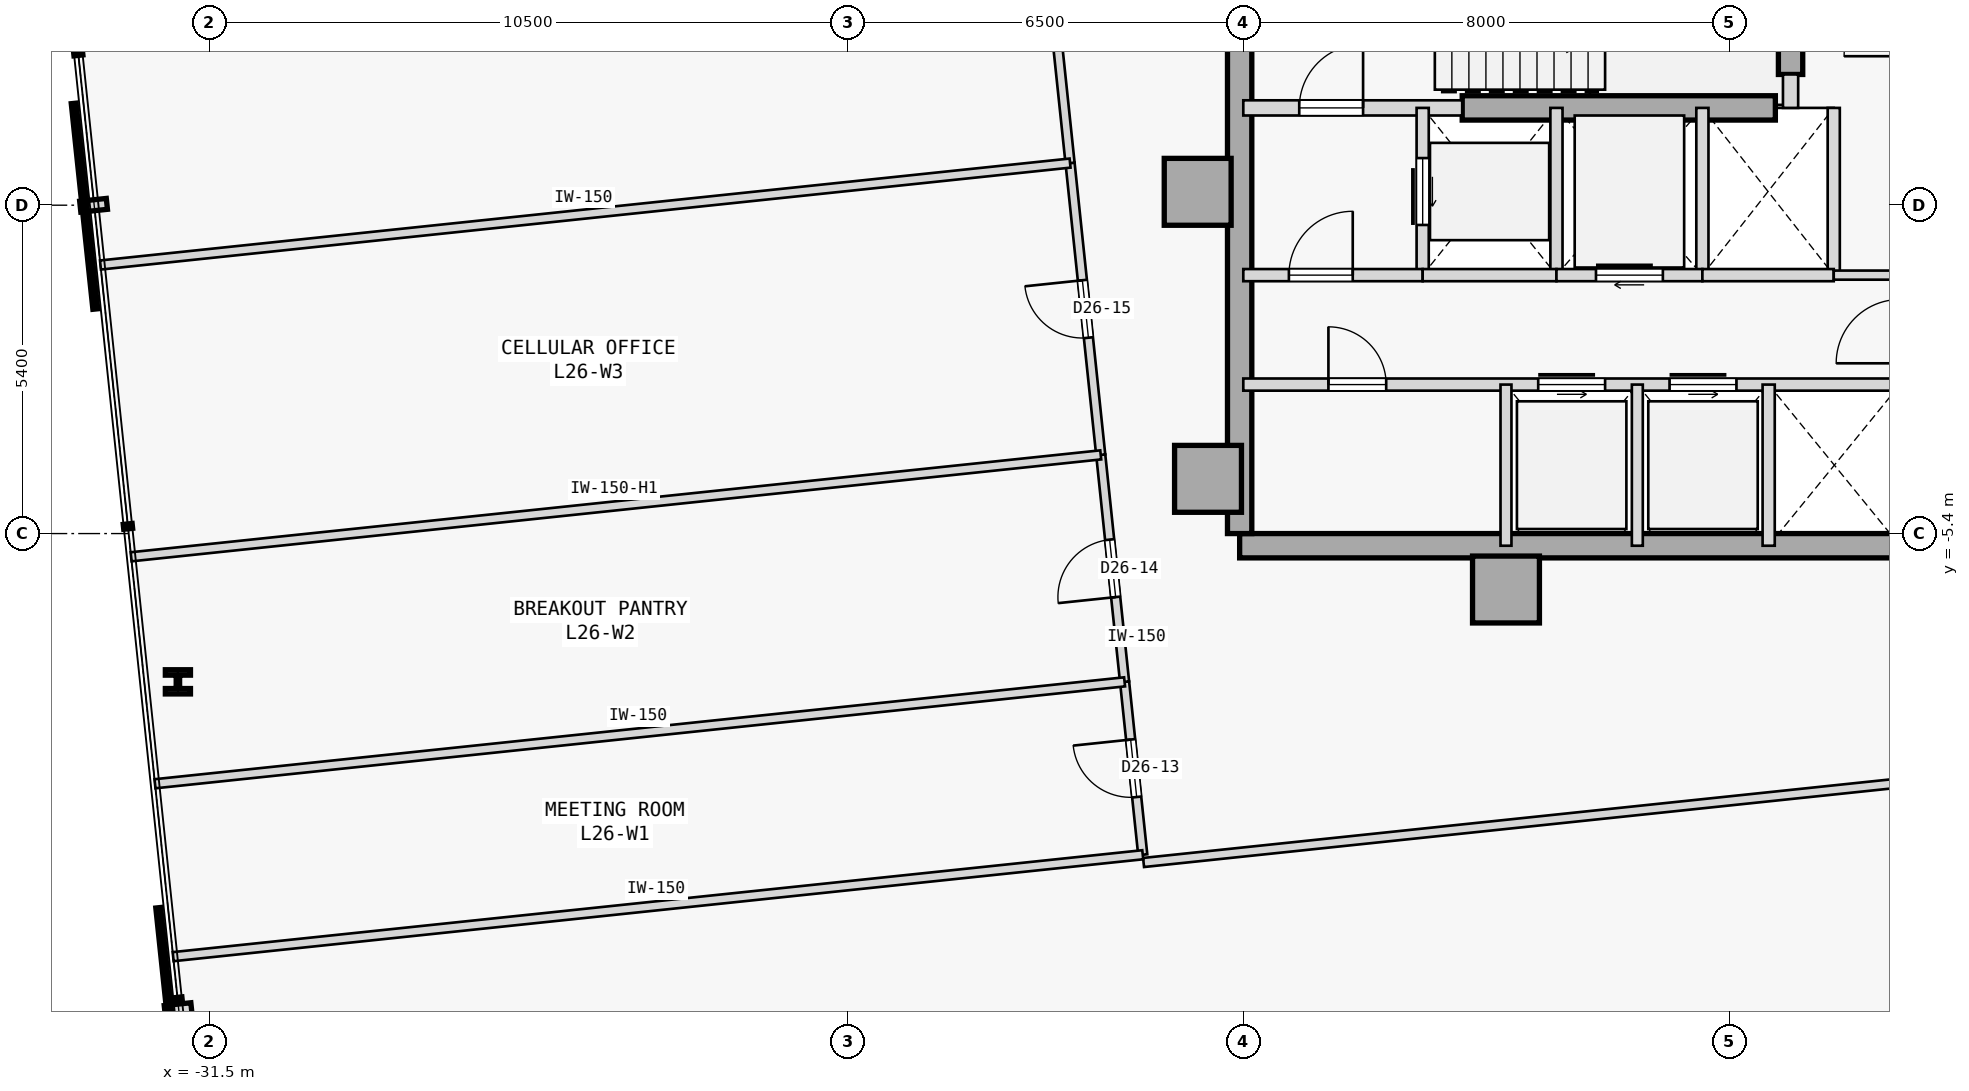
"""IFC4 building model, lengths in metres.
Left out: names, types, materials, properties, quantities, classifications, styles, units other than length and angle.
Written with IfcOpenShell. Run it as: python <this file> out.ifc"""

import sys

from ifc_helpers import new_model, si_unit, direction, frame, frame_2d, origin, origin_2d, place, context, subcontext, project, spatial, rectangle, i_section, extrude, element, fill, save


model = new_model("IFC4")
c1 = context("Model", 3, precision=1e-05, world=origin(), true_north=direction((0.0, 1.0)))
c2 = subcontext(c1, "Body", "Model", "MODEL_VIEW")
j1 = project(units=[si_unit("LENGTHUNIT", "METRE"), si_unit("PLANEANGLEUNIT", "RADIAN")], contexts=[c1])
p1 = place(None, origin())
s1 = spatial("IfcSite", under=j1, at=p1, CompositionType="ELEMENT")
p2 = place(p1, origin())
s2 = spatial("IfcBuilding", under=s1, at=p2, CompositionType="ELEMENT")
p3 = place(p2, frame((0.0, 0.0, 105.9)))
s3 = spatial("IfcBuildingStorey", under=s2, at=p3, CompositionType="ELEMENT", Elevation=105.9)
for number, where, z_axis, x_axis in (
    (1, (-15.25, 0.22, 0.0), (0.0, 0.0, 1.0), (1.0, 0.0, 0.0)),
    (2, (-15.08, -4.5, 0.0), (0.0, 0.0, 1.0), (1.0, 0.0, 0.0)),
    (3, (-10.18, -6.32, 0.0), (0.0, 0.0, 1.0), (1.0, 0.0, 0.0)),
):
    element("IfcColumn", number, at=place(p3, frame(where, z_axis=z_axis, x_axis=x_axis)), inside=s3, PredefinedType="COLUMN", context=c2, shape_type="SweptSolid", body=[
        extrude(rectangle(XDim=1.1, YDim=1.1, at=origin_2d()), origin(), (0.0, 0.0, 1.0), 3.7),
    ])
p4 = place(p3, frame((-14.56, -5.6, 0.0), z_axis=(0.0, 0.0, 1.0), x_axis=(1.0, 0.0, 0.0)))
e4 = element("IfcWall", 4, at=p4, inside=s3, PredefinedType="SHEAR", context=c2, shape_type="SweptSolid", body=[
    extrude(rectangle(XDim=10.86, YDim=0.4, at=frame_2d((5.43, 0.0))), origin(), (0.0, 0.0, 1.0), 3.475),
])
p5 = place(p3, frame((-14.56, -5.4, 0.0), z_axis=(0.0, 0.0, 1.0), x_axis=(0.0, 1.0, 0.0)))
e5 = element("IfcWall", 5, at=p5, inside=s3, PredefinedType="SHEAR", context=c2, shape_type="SweptSolid", body=[
    extrude(rectangle(XDim=10.8, YDim=0.4, at=frame_2d((5.4, 0.0))), origin(), (0.0, 0.0, 1.0), 3.475),
])
p6 = place(p3, frame((-5.5, 2.15, 0.0), z_axis=(0.0, 0.0, 1.0), x_axis=(0.0, 1.0, 0.0)))
e6 = element("IfcWall", 6, at=p6, inside=s3, PredefinedType="SHEAR", context=c2, shape_type="SweptSolid", body=[
    extrude(rectangle(XDim=3.25, YDim=0.4, at=frame_2d((1.625, 0.0))), origin(), (0.0, 0.0, 1.0), 3.475),
])
p7 = place(p3, frame((-10.9, 1.6, 0.0), z_axis=(0.0, 0.0, 1.0), x_axis=(1.0, 0.0, 0.0)))
e7 = element("IfcWall", 7, at=p7, inside=s3, PredefinedType="SHEAR", context=c2, shape_type="SweptSolid", body=[
    extrude(rectangle(XDim=5.15, YDim=0.4, at=frame_2d((2.575, 0.0))), origin(), (0.0, 0.0, 1.0), 3.475),
])
p8 = place(p3, frame((-32.021, -7.838, 0.0), z_axis=(0.0, 0.0, 1.0), x_axis=(1.0, 0.0, 0.0)))
e8 = element("IfcColumn", 8, at=p8, inside=s3, PredefinedType="COLUMN", context=c2, shape_type="SweptSolid", body=[
    extrude(i_section(OverallWidth=0.413, OverallDepth=0.398, WebThickness=0.056, FlangeThickness=0.089, FilletRadius=0.015, at=origin_2d()), origin(), (0.0, 0.0, 1.0), 3.7),
])
p9 = place(p3, frame((-14.5, 1.6, 0.0), z_axis=(0.0, 0.0, 1.0), x_axis=(1.0, 0.0, 0.0)))
e9 = element("IfcWall", 9, at=p9, inside=s3, PredefinedType="STANDARD", context=c2, shape_type="SweptSolid", body=[
    extrude(rectangle(XDim=3.6, YDim=0.25, at=frame_2d((1.8, 0.0))), origin(), (0.0, 0.0, 1.0), 3.475),
])
p10 = place(p9, frame((0.92, 0.0, 0.0)))
e10 = element("IfcOpeningElement", 10, at=p10, cuts=e9, PredefinedType="OPENING", context=c2, shape_type="SweptSolid", body=[
    extrude(rectangle(XDim=1.05, YDim=2.15, at=frame_2d((0.525, 1.075))), frame((0.0, 0.135, 0.0), z_axis=(0.0, -1.0, 0.0), x_axis=(1.0, 0.0, 0.0)), (0.0, 0.0, 1.0), 0.27),
])
p11 = place(p3, frame((-5.5, 1.6, 0.0), z_axis=(0.0, 0.0, 1.0), x_axis=(0.0, 1.0, 0.0)))
e11 = element("IfcWall", 11, at=p11, inside=s3, PredefinedType="STANDARD", context=c2, shape_type="SweptSolid", body=[
    extrude(rectangle(XDim=0.55, YDim=0.25, at=frame_2d((0.275, 0.0))), origin(), (0.0, 0.0, 1.0), 3.475),
])
p12 = place(p3, frame((-11.55, -1.15, 0.0), z_axis=(0.0, 0.0, 1.0), x_axis=(0.0, 1.0, 0.0)))
e12 = element("IfcWall", 12, at=p12, inside=s3, PredefinedType="STANDARD", context=c2, shape_type="SweptSolid", body=[
    extrude(rectangle(XDim=2.75, YDim=0.2, at=frame_2d((1.375, 0.0))), origin(), (0.0, 0.0, 1.0), 3.475),
])
p13 = place(p12, frame((0.825, 0.0, 0.0)))
e13 = element("IfcOpeningElement", 13, at=p13, cuts=e12, PredefinedType="OPENING", context=c2, shape_type="SweptSolid", body=[
    extrude(rectangle(XDim=1.1, YDim=2.15, at=frame_2d((0.55, 1.075))), frame((0.0, 0.11, 0.0), z_axis=(0.0, -1.0, 0.0), x_axis=(1.0, 0.0, 0.0)), (0.0, 0.0, 1.0), 0.22),
])
p14 = place(p3, frame((-9.35, -1.15, 0.0), z_axis=(0.0, 0.0, 1.0), x_axis=(0.0, 1.0, 0.0)))
e14 = element("IfcWall", 14, at=p14, inside=s3, PredefinedType="STANDARD", context=c2, shape_type="SweptSolid", body=[
    extrude(rectangle(XDim=2.75, YDim=0.2, at=frame_2d((1.375, 0.0))), origin(), (0.0, 0.0, 1.0), 3.475),
])
p15 = place(p3, frame((-14.5, -1.15, 0.0), z_axis=(0.0, 0.0, 1.0), x_axis=(1.0, 0.0, 0.0)))
e15 = element("IfcWall", 15, at=p15, inside=s3, PredefinedType="STANDARD", context=c2, shape_type="SweptSolid", body=[
    extrude(rectangle(XDim=2.95, YDim=0.2, at=frame_2d((1.475, 0.0))), origin(), (0.0, 0.0, 1.0), 3.475),
])
p16 = place(p15, frame((0.75, 0.0, 0.0)))
e16 = element("IfcOpeningElement", 16, at=p16, cuts=e15, PredefinedType="OPENING", context=c2, shape_type="SweptSolid", body=[
    extrude(rectangle(XDim=1.05, YDim=2.18, at=frame_2d((0.525, 1.09))), frame((0.0, 0.11, 0.0), z_axis=(0.0, -1.0, 0.0), x_axis=(1.0, 0.0, 0.0)), (0.0, 0.0, 1.0), 0.22),
])
p17 = place(p3, frame((-11.55, -1.15, 0.0), z_axis=(0.0, 0.0, 1.0), x_axis=(1.0, 0.0, 0.0)))
e17 = element("IfcWall", 17, at=p17, inside=s3, PredefinedType="STANDARD", context=c2, shape_type="SweptSolid", body=[
    extrude(rectangle(XDim=2.2, YDim=0.2, at=frame_2d((1.1, 0.0))), origin(), (0.0, 0.0, 1.0), 3.475),
])
p18 = place(p3, frame((-6.95, -1.15, 0.0), z_axis=(0.0, 0.0, 1.0), x_axis=(0.0, 1.0, 0.0)))
e18 = element("IfcWall", 18, at=p18, inside=s3, PredefinedType="STANDARD", context=c2, shape_type="SweptSolid", body=[
    extrude(rectangle(XDim=2.75, YDim=0.2, at=frame_2d((1.375, 0.0))), origin(), (0.0, 0.0, 1.0), 3.475),
])
p19 = place(p3, frame((-9.35, -1.15, 0.0), z_axis=(0.0, 0.0, 1.0), x_axis=(1.0, 0.0, 0.0)))
e19 = element("IfcWall", 19, at=p19, inside=s3, PredefinedType="STANDARD", context=c2, shape_type="SweptSolid", body=[
    extrude(rectangle(XDim=2.4, YDim=0.2, at=frame_2d((1.2, 0.0))), origin(), (0.0, 0.0, 1.0), 3.475),
])
p20 = place(p19, frame((0.65, 0.0, 0.0)))
e20 = element("IfcOpeningElement", 20, at=p20, cuts=e19, PredefinedType="OPENING", context=c2, shape_type="SweptSolid", body=[
    extrude(rectangle(XDim=1.1, YDim=2.15, at=frame_2d((0.55, 1.075))), frame((0.0, 0.11, 0.0), z_axis=(0.0, -1.0, 0.0), x_axis=(1.0, 0.0, 0.0)), (0.0, 0.0, 1.0), 0.22),
])
p21 = place(p3, frame((-4.79, -1.15, 0.0), z_axis=(0.0, 0.0, 1.0), x_axis=(0.0, 1.0, 0.0)))
e21 = element("IfcWall", 21, at=p21, inside=s3, PredefinedType="STANDARD", context=c2, shape_type="SweptSolid", body=[
    extrude(rectangle(XDim=2.75, YDim=0.2, at=frame_2d((1.375, 0.0))), origin(), (0.0, 0.0, 1.0), 3.475),
])
p22 = place(p3, frame((-6.95, -1.15, 0.0), z_axis=(0.0, 0.0, 1.0), x_axis=(1.0, 0.0, 0.0)))
e22 = element("IfcWall", 22, at=p22, inside=s3, PredefinedType="STANDARD", context=c2, shape_type="SweptSolid", body=[
    extrude(rectangle(XDim=2.16, YDim=0.2, at=frame_2d((1.08, 0.0))), origin(), (0.0, 0.0, 1.0), 3.475),
])
p23 = place(p3, frame((-4.79, -1.15, 0.0), z_axis=(0.0, 0.0, 1.0), x_axis=(1.0, 0.0, 0.0)))
e23 = element("IfcWall", 23, at=p23, inside=s3, PredefinedType="PARTITIONING", context=c2, shape_type="SweptSolid", body=[
    extrude(rectangle(XDim=1.09, YDim=0.15, at=frame_2d((0.545, 0.0))), origin(), (0.0, 0.0, 1.0), 3.475),
])
p24 = place(p3, frame((-14.5, -2.95, 0.0), z_axis=(0.0, 0.0, 1.0), x_axis=(1.0, 0.0, 0.0)))
e24 = element("IfcWall", 24, at=p24, inside=s3, PredefinedType="STANDARD", context=c2, shape_type="SweptSolid", body=[
    extrude(rectangle(XDim=10.8, YDim=0.2, at=frame_2d((5.4, 0.0))), origin(), (0.0, 0.0, 1.0), 3.475),
])
p25 = place(p24, frame((4.85, 0.0, 0.0)))
e25 = element("IfcOpeningElement", 25, at=p25, cuts=e24, PredefinedType="OPENING", context=c2, shape_type="SweptSolid", body=[
    extrude(rectangle(XDim=1.1, YDim=2.15, at=frame_2d((0.55, 1.075))), frame((0.0, 0.11, 0.0), z_axis=(0.0, -1.0, 0.0), x_axis=(1.0, 0.0, 0.0)), (0.0, 0.0, 1.0), 0.22),
])
p26 = place(p24, frame((7.01, 0.0, 0.0)))
e26 = element("IfcOpeningElement", 26, at=p26, cuts=e24, PredefinedType="OPENING", context=c2, shape_type="SweptSolid", body=[
    extrude(rectangle(XDim=1.1, YDim=2.15, at=frame_2d((0.55, 1.075))), frame((0.0, 0.11, 0.0), z_axis=(0.0, -1.0, 0.0), x_axis=(1.0, 0.0, 0.0)), (0.0, 0.0, 1.0), 0.22),
])
p27 = place(p24, frame((1.4, 0.0, 0.0)))
e27 = element("IfcOpeningElement", 27, at=p27, cuts=e24, PredefinedType="OPENING", context=c2, shape_type="SweptSolid", body=[
    extrude(rectangle(XDim=0.95, YDim=2.15, at=frame_2d((0.475, 1.075))), frame((0.0, 0.11, 0.0), z_axis=(0.0, -1.0, 0.0), x_axis=(1.0, 0.0, 0.0)), (0.0, 0.0, 1.0), 0.22),
])
p28 = place(p3, frame((-5.86, -5.6, 0.0), z_axis=(0.0, 0.0, 1.0), x_axis=(0.0, 1.0, 0.0)))
e28 = element("IfcWall", 28, at=p28, inside=s3, PredefinedType="STANDARD", context=c2, shape_type="SweptSolid", body=[
    extrude(rectangle(XDim=2.65, YDim=0.2, at=frame_2d((1.325, 0.0))), origin(), (0.0, 0.0, 1.0), 3.475),
])
for number, where, z_axis, x_axis in (
    (29, (-10.18, -5.6, 0.0), (0.0, 0.0, 1.0), (0.0, 1.0, 0.0)),
    (30, (-8.02, -5.6, 0.0), (0.0, 0.0, 1.0), (0.0, 1.0, 0.0)),
):
    element("IfcWall", number, at=place(p3, frame(where, z_axis=z_axis, x_axis=x_axis)), inside=s3, PredefinedType="STANDARD", context=c2, shape_type="SweptSolid", body=[
        extrude(rectangle(XDim=2.65, YDim=0.18, at=frame_2d((1.325, 0.0))), origin(), (0.0, 0.0, 1.0), 3.475),
    ])
p29 = place(p3, frame((-16.14, -10.809, 0.0), z_axis=(0.0, 0.0, 1.0), x_axis=(0.994522174335, 0.104525809046, 0.0)))
e31 = element("IfcWall", 31, at=p29, inside=s3, PredefinedType="PARTITIONING", context=c2, shape_type="SweptSolid", body=[
    extrude(rectangle(XDim=31.817, YDim=0.15, at=frame_2d((15.908, 0.0))), origin(), (0.0, 0.0, 1.0), 3.475),
])
p30 = place(p29, frame((15.434, 0.0, 0.0)))
e32 = element("IfcOpeningElement", 32, at=p30, cuts=e31, PredefinedType="OPENING", context=c2, shape_type="SweptSolid", body=[
    extrude(rectangle(XDim=0.95, YDim=2.15, at=frame_2d((0.475, 1.075))), frame((0.0, 0.085, 0.0), z_axis=(0.0, -1.0, 0.0), x_axis=(1.0, 0.0, 0.0)), (0.0, 0.0, 1.0), 0.17),
])
p31 = place(p3, frame((-16.153, -10.682, 0.0), z_axis=(0.0, 0.0, 1.0), x_axis=(-0.104600331874, 0.994514339048, 0.0)))
e33 = element("IfcWall", 33, at=p31, inside=s3, PredefinedType="PARTITIONING", context=c2, shape_type="SweptSolid", body=[
    extrude(rectangle(XDim=2.859, YDim=0.15, at=frame_2d((1.43, 0.0))), origin(), (0.0, 0.0, 1.0), 3.475),
])
p32 = place(p31, frame((0.955, 0.0, 0.0)))
e34 = element("IfcOpeningElement", 34, at=p32, cuts=e33, PredefinedType="OPENING", context=c2, shape_type="SweptSolid", body=[
    extrude(rectangle(XDim=0.95, YDim=2.15, at=frame_2d((0.475, 1.075))), frame((0.0, 0.085, 0.0), z_axis=(0.0, -1.0, 0.0), x_axis=(1.0, 0.0, 0.0)), (0.0, 0.0, 1.0), 0.17),
])
p33 = place(p3, frame((-16.452, -7.838, 0.0), z_axis=(0.0, 0.0, 1.0), x_axis=(-0.104481590513, 0.994526820777, 0.0)))
e35 = element("IfcWall", 35, at=p33, inside=s3, PredefinedType="PARTITIONING", context=c2, shape_type="SweptSolid", body=[
    extrude(rectangle(XDim=3.753, YDim=0.15, at=frame_2d((1.876, 0.0))), origin(), (0.0, 0.0, 1.0), 3.475),
])
p34 = place(p33, frame((1.402, 0.0, 0.0)))
e36 = element("IfcOpeningElement", 36, at=p34, cuts=e35, PredefinedType="OPENING", context=c2, shape_type="SweptSolid", body=[
    extrude(rectangle(XDim=0.95, YDim=2.15, at=frame_2d((0.475, 1.075))), frame((0.0, 0.085, 0.0), z_axis=(0.0, -1.0, 0.0), x_axis=(1.0, 0.0, 0.0)), (0.0, 0.0, 1.0), 0.17),
])
p35 = place(p3, frame((-16.844, -4.106, 0.0), z_axis=(0.0, 0.0, 1.0), x_axis=(-0.104537284168, 0.994520968215, 0.0)))
e37 = element("IfcWall", 37, at=p35, inside=s3, PredefinedType="PARTITIONING", context=c2, shape_type="SweptSolid", body=[
    extrude(rectangle(XDim=4.825, YDim=0.15, at=frame_2d((2.413, 0.0))), origin(), (0.0, 0.0, 1.0), 3.475),
])
p36 = place(p35, frame((1.938, 0.0, 0.0)))
e38 = element("IfcOpeningElement", 38, at=p36, cuts=e37, PredefinedType="OPENING", context=c2, shape_type="SweptSolid", body=[
    extrude(rectangle(XDim=0.95, YDim=2.15, at=frame_2d((0.475, 1.075))), frame((0.0, 0.085, 0.0), z_axis=(0.0, -1.0, 0.0), x_axis=(1.0, 0.0, 0.0)), (0.0, 0.0, 1.0), 0.17),
])
p37 = place(p3, frame((-17.349, 0.692, 0.0), z_axis=(0.0, 0.0, 1.0), x_axis=(-0.104514890797, 0.994523321799, 0.0)))
e39 = element("IfcWall", 39, at=p37, inside=s3, PredefinedType="PARTITIONING", context=c2, shape_type="SweptSolid", body=[
    extrude(rectangle(XDim=6.433, YDim=0.15, at=frame_2d((3.217, 0.0))), origin(), (0.0, 0.0, 1.0), 3.475),
])
p38 = place(p37, frame((2.741, 0.0, 0.0)))
e40 = element("IfcOpeningElement", 40, at=p38, cuts=e39, PredefinedType="OPENING", context=c2, shape_type="SweptSolid", body=[
    extrude(rectangle(XDim=0.95, YDim=2.15, at=frame_2d((0.475, 1.075))), frame((0.0, 0.085, 0.0), z_axis=(0.0, -1.0, 0.0), x_axis=(1.0, 0.0, 0.0)), (0.0, 0.0, 1.0), 0.17),
])
p39 = place(p3, frame((-32.099, -12.358, 0.0), z_axis=(0.0, 0.0, 1.0), x_axis=(0.994522794159, 0.104519911488, 0.0)))
e41 = element("IfcWall", 41, at=p39, inside=s3, PredefinedType="PARTITIONING", context=c2, shape_type="SweptSolid", body=[
    extrude(rectangle(XDim=16.033, YDim=0.15, at=frame_2d((8.017, 0.0))), origin(), (0.0, 0.0, 1.0), 3.475),
])
p40 = place(p3, frame((-32.397, -9.514, 0.0), z_axis=(0.0, 0.0, 1.0), x_axis=(0.994521044813, 0.104536555445, 0.0)))
e42 = element("IfcWall", 42, at=p40, inside=s3, PredefinedType="PARTITIONING", context=c2, shape_type="SweptSolid", body=[
    extrude(rectangle(XDim=16.033, YDim=0.15, at=frame_2d((8.017, 0.0))), origin(), (0.0, 0.0, 1.0), 3.475),
])
p41 = place(p3, frame((-32.79, -5.782, 0.0), z_axis=(0.0, 0.0, 1.0), x_axis=(0.994522794159, 0.104519911488, 0.0)))
e43 = element("IfcWall", 43, at=p41, inside=s3, PredefinedType="PARTITIONING", context=c2, shape_type="SweptSolid", body=[
    extrude(rectangle(XDim=16.033, YDim=0.15, at=frame_2d((8.017, 0.0))), origin(), (0.0, 0.0, 1.0), 3.025),
])
p42 = place(p3, frame((-33.294, -0.983, 0.0), z_axis=(0.0, 0.0, 1.0), x_axis=(0.994522794159, 0.104519911488, 0.0)))
e44 = element("IfcWall", 44, at=p42, inside=s3, PredefinedType="PARTITIONING", context=c2, shape_type="SweptSolid", body=[
    extrude(rectangle(XDim=16.033, YDim=0.15, at=frame_2d((8.017, 0.0))), origin(), (0.0, 0.0, 1.0), 3.475),
])
p43 = place(p10, origin())
e45 = element("IfcDoor", 45, at=p43, inside=s3, OperationType="SINGLE_SWING_RIGHT", PredefinedType="DOOR", context=c2, shape_type="SweptSolid", body=[
    extrude(rectangle(XDim=1.05, YDim=2.15, at=frame_2d((0.525, 1.075))), frame((0.0, 0.025, 0.0), z_axis=(0.0, -1.0, 0.0), x_axis=(1.0, 0.0, 0.0)), (0.0, 0.0, 1.0), 0.05),
])
fill(e10, e45)
p44 = place(p16, origin())
e46 = element("IfcDoor", 46, at=p44, inside=s3, OperationType="SINGLE_SWING_RIGHT", PredefinedType="DOOR", context=c2, shape_type="SweptSolid", body=[
    extrude(rectangle(XDim=1.05, YDim=2.18, at=frame_2d((0.525, 1.09))), frame((0.0, 0.025, 0.0), z_axis=(0.0, -1.0, 0.0), x_axis=(1.0, 0.0, 0.0)), (0.0, 0.0, 1.0), 0.05),
])
fill(e16, e46)
p45 = place(p13, origin())
e47 = element("IfcDoor", 47, at=p45, inside=s3, OperationType="SLIDING_TO_RIGHT", PredefinedType="DOOR", context=c2, shape_type="SweptSolid", body=[
    extrude(rectangle(XDim=1.1, YDim=2.15, at=frame_2d((0.55, 1.075))), frame((0.0, 0.025, 0.0), z_axis=(0.0, -1.0, 0.0), x_axis=(1.0, 0.0, 0.0)), (0.0, 0.0, 1.0), 0.05),
])
fill(e13, e47)
p46 = place(p20, origin())
e48 = element("IfcDoor", 48, at=p46, inside=s3, OperationType="SLIDING_TO_RIGHT", PredefinedType="DOOR", context=c2, shape_type="SweptSolid", body=[
    extrude(rectangle(XDim=1.1, YDim=2.15, at=frame_2d((0.55, 1.075))), frame((0.0, 0.025, 0.0), z_axis=(0.0, -1.0, 0.0), x_axis=(1.0, 0.0, 0.0)), (0.0, 0.0, 1.0), 0.05),
])
fill(e20, e48)
p47 = place(p25, origin())
e49 = element("IfcDoor", 49, at=p47, inside=s3, OperationType="SLIDING_TO_LEFT", PredefinedType="DOOR", context=c2, shape_type="SweptSolid", body=[
    extrude(rectangle(XDim=1.1, YDim=2.15, at=frame_2d((0.55, 1.075))), frame((0.0, 0.025, 0.0), z_axis=(0.0, -1.0, 0.0), x_axis=(1.0, 0.0, 0.0)), (0.0, 0.0, 1.0), 0.05),
])
fill(e25, e49)
p48 = place(p26, origin())
e50 = element("IfcDoor", 50, at=p48, inside=s3, OperationType="SLIDING_TO_LEFT", PredefinedType="DOOR", context=c2, shape_type="SweptSolid", body=[
    extrude(rectangle(XDim=1.1, YDim=2.15, at=frame_2d((0.55, 1.075))), frame((0.0, 0.025, 0.0), z_axis=(0.0, -1.0, 0.0), x_axis=(1.0, 0.0, 0.0)), (0.0, 0.0, 1.0), 0.05),
])
fill(e26, e50)
p49 = place(p27, origin())
e51 = element("IfcDoor", 51, at=p49, inside=s3, OperationType="SINGLE_SWING_LEFT", PredefinedType="DOOR", context=c2, shape_type="SweptSolid", body=[
    extrude(rectangle(XDim=0.95, YDim=2.15, at=frame_2d((0.475, 1.075))), frame((0.0, 0.025, 0.0), z_axis=(0.0, -1.0, 0.0), x_axis=(1.0, 0.0, 0.0)), (0.0, 0.0, 1.0), 0.05),
])
fill(e27, e51)
p50 = place(p32, origin())
e52 = element("IfcDoor", 52, at=p50, inside=s3, OperationType="SINGLE_SWING_RIGHT", PredefinedType="DOOR", context=c2, shape_type="SweptSolid", body=[
    extrude(rectangle(XDim=0.95, YDim=2.15, at=frame_2d((0.475, 1.075))), frame((0.0, 0.025, 0.0), z_axis=(0.0, -1.0, 0.0), x_axis=(1.0, 0.0, 0.0)), (0.0, 0.0, 1.0), 0.05),
])
fill(e34, e52)
p51 = place(p34, origin())
e53 = element("IfcDoor", 53, at=p51, inside=s3, OperationType="SINGLE_SWING_LEFT", PredefinedType="DOOR", context=c2, shape_type="SweptSolid", body=[
    extrude(rectangle(XDim=0.95, YDim=2.15, at=frame_2d((0.475, 1.075))), frame((0.0, 0.025, 0.0), z_axis=(0.0, -1.0, 0.0), x_axis=(1.0, 0.0, 0.0)), (0.0, 0.0, 1.0), 0.05),
])
fill(e36, e53)
p52 = place(p36, origin())
e54 = element("IfcDoor", 54, at=p52, inside=s3, OperationType="SINGLE_SWING_RIGHT", PredefinedType="DOOR", context=c2, shape_type="SweptSolid", body=[
    extrude(rectangle(XDim=0.95, YDim=2.15, at=frame_2d((0.475, 1.075))), frame((0.0, 0.025, 0.0), z_axis=(0.0, -1.0, 0.0), x_axis=(1.0, 0.0, 0.0)), (0.0, 0.0, 1.0), 0.05),
])
fill(e38, e54)
save(model, sys.argv[1])
